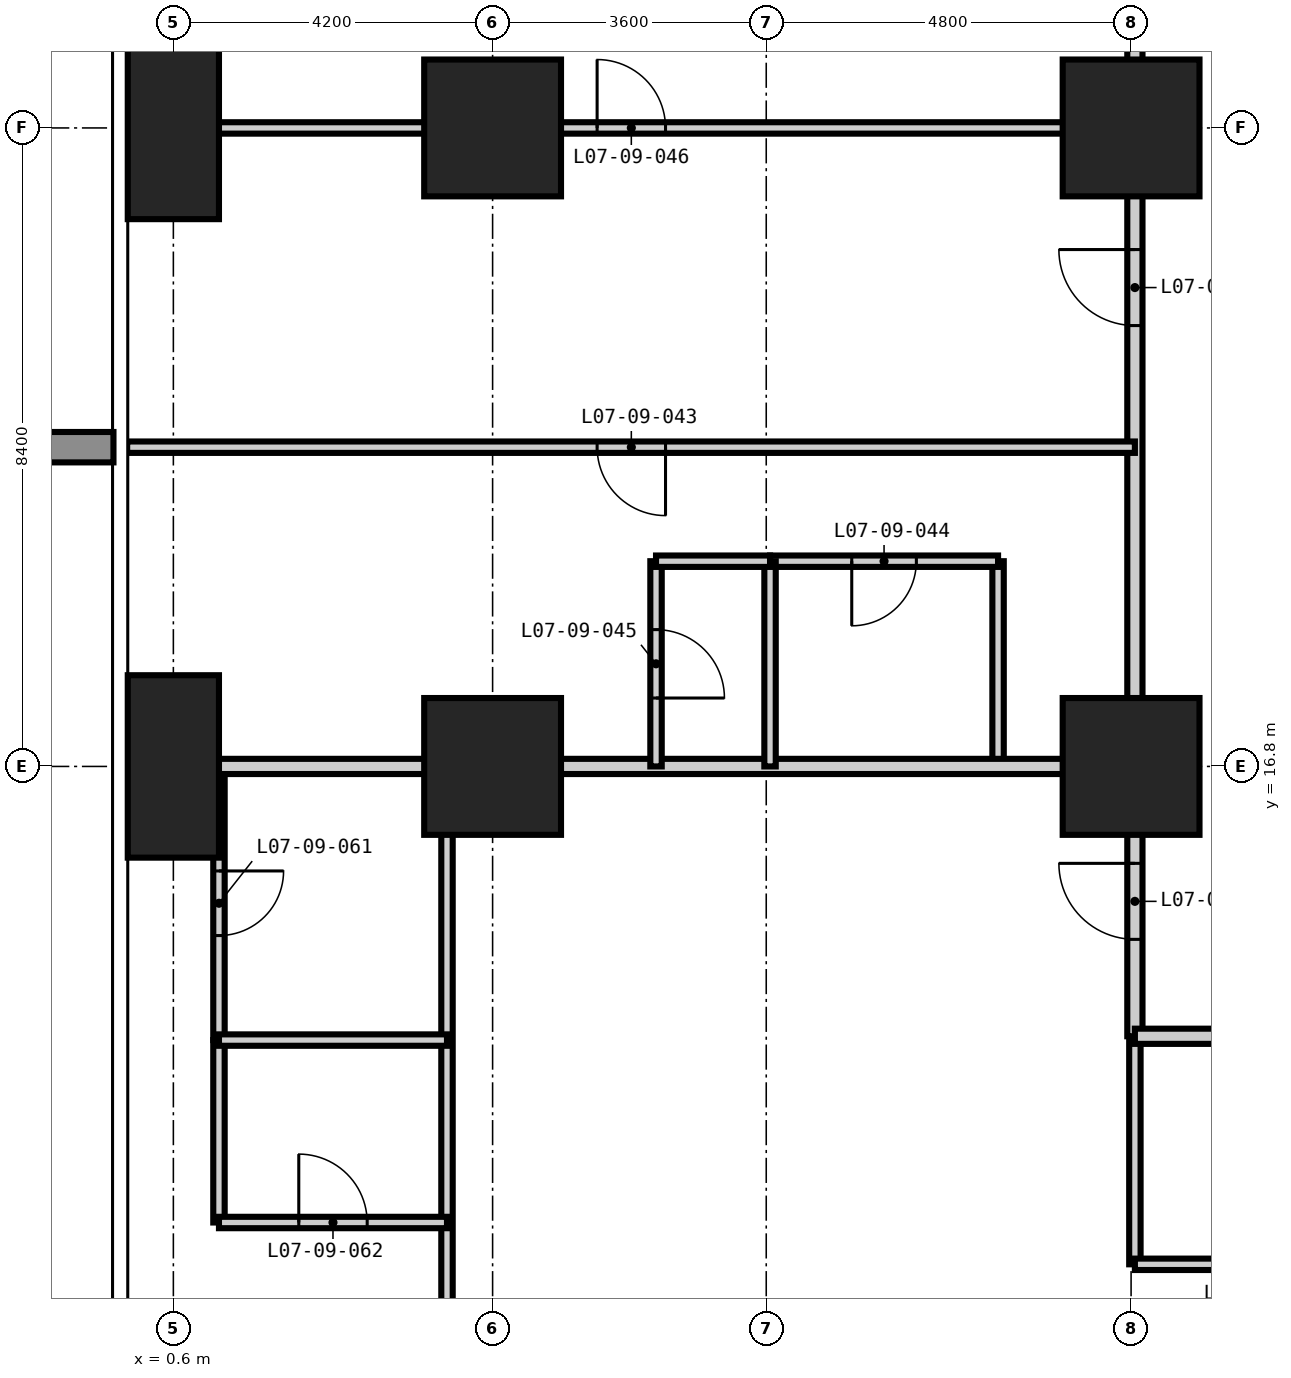
"""IFC4 building model, lengths in metres.
Left out: names, types, materials, properties, quantities, classifications, styles, units other than length and angle.
Written with IfcOpenShell. Run it as: python <this file> out.ifc"""

import sys

from ifc_helpers import new_model, si_unit, direction, frame, frame_2d, origin, origin_2d, place, context, subcontext, project, spatial, rectangle, extrude, element, fill, save


model = new_model("IFC4")
c1 = context("Model", 3, precision=1e-05, world=origin(), true_north=direction((0.0, 1.0)))
c2 = subcontext(c1, "Body", "Model", "MODEL_VIEW")
j1 = project(units=[si_unit("LENGTHUNIT", "METRE"), si_unit("PLANEANGLEUNIT", "RADIAN")], contexts=[c1])
p1 = place(None, origin())
s1 = spatial("IfcSite", under=j1, at=p1, CompositionType="ELEMENT")
p2 = place(p1, origin())
s2 = spatial("IfcBuilding", under=s1, at=p2, CompositionType="ELEMENT")
p3 = place(p2, frame((0.0, 0.0, 34.2)))
s3 = spatial("IfcBuildingStorey", under=s2, at=p3, CompositionType="ELEMENT", Elevation=34.2)
for number, where, z_axis, x_axis in (
    (1, (0.6, 16.8, -0.35), (0.0, 0.0, 1.0), (1.0, 0.0, 0.0)),
    (2, (0.6, 25.2, -0.35), (0.0, 0.0, 1.0), (1.0, 0.0, 0.0)),
):
    element("IfcColumn", number, at=place(p3, frame(where, z_axis=z_axis, x_axis=x_axis)), inside=s3, PredefinedType="COLUMN", context=c2, shape_type="SweptSolid", body=[
        extrude(rectangle(XDim=1.2, YDim=2.4, at=origin_2d()), origin(), (0.0, 0.0, 1.0), 3.6),
    ])
for number, where, z_axis, x_axis in (
    (3, (4.8, 16.8, -0.35), (0.0, 0.0, 1.0), (1.0, 0.0, 0.0)),
    (4, (4.8, 25.2, -0.35), (0.0, 0.0, 1.0), (1.0, 0.0, 0.0)),
    (5, (13.2, 16.8, -0.35), (0.0, 0.0, 1.0), (1.0, 0.0, 0.0)),
    (6, (13.2, 25.2, -0.35), (0.0, 0.0, 1.0), (1.0, 0.0, 0.0)),
):
    element("IfcColumn", number, at=place(p3, frame(where, z_axis=z_axis, x_axis=x_axis)), inside=s3, PredefinedType="COLUMN", context=c2, shape_type="SweptSolid", body=[
        extrude(rectangle(XDim=1.8, YDim=1.8, at=origin_2d()), origin(), (0.0, 0.0, 1.0), 3.6),
    ])
p4 = place(p3, frame((1.2, 13.2, 0.0), z_axis=(0.0, 0.0, 1.0), x_axis=(0.0, 1.0, 0.0)))
e7 = element("IfcWall", 7, at=p4, inside=s3, PredefinedType="PARTITIONING", context=c2, shape_type="SweptSolid", body=[
    extrude(rectangle(XDim=3.6, YDim=0.15, at=frame_2d((1.8, 0.0))), origin(), (0.0, 0.0, 1.0), 3.25),
])
p5 = place(p4, frame((1.375, 0.0, 0.0)))
e8 = element("IfcOpeningElement", 8, at=p5, cuts=e7, PredefinedType="OPENING", context=c2, shape_type="SweptSolid", body=[
    extrude(rectangle(XDim=0.85, YDim=2.1, at=frame_2d((0.425, 1.05))), frame((0.0, 0.085, 0.0), z_axis=(0.0, -1.0, 0.0), x_axis=(1.0, 0.0, 0.0)), (0.0, 0.0, 1.0), 0.17),
])
p6 = place(p3, frame((11.45, 16.8, 0.0), z_axis=(0.0, 0.0, 1.0), x_axis=(0.0, 1.0, 0.0)))
e9 = element("IfcWall", 9, at=p6, inside=s3, PredefinedType="PARTITIONING", context=c2, shape_type="SweptSolid", body=[
    extrude(rectangle(XDim=2.7, YDim=0.15, at=frame_2d((1.35, 0.0))), origin(), (0.0, 0.0, 1.0), 3.25),
])
p7 = place(p3, frame((13.25, 10.25, 0.0), z_axis=(0.0, 0.0, 1.0), x_axis=(0.0, 1.0, 0.0)))
e10 = element("IfcWall", 10, at=p7, inside=s3, PredefinedType="PARTITIONING", context=c2, shape_type="SweptSolid", body=[
    extrude(rectangle(XDim=3.0, YDim=0.15, at=frame_2d((1.5, 0.0))), origin(), (0.0, 0.0, 1.0), 3.25),
])
p8 = place(p3, frame((13.25, 10.25, 0.0), z_axis=(0.0, 0.0, 1.0), x_axis=(1.0, 0.0, 0.0)))
e11 = element("IfcWall", 11, at=p8, inside=s3, PredefinedType="PARTITIONING", context=c2, shape_type="SweptSolid", body=[
    extrude(rectangle(XDim=3.55, YDim=0.15, at=frame_2d((1.775, 0.0))), origin(), (0.0, 0.0, 1.0), 3.25),
])
p9 = place(p8, frame((1.35, 0.0, 0.0)))
e12 = element("IfcOpeningElement", 12, at=p9, cuts=e11, PredefinedType="OPENING", context=c2, shape_type="SweptSolid", body=[
    extrude(rectangle(XDim=0.85, YDim=2.1, at=frame_2d((0.425, 1.05))), frame((0.0, 0.085, 0.0), z_axis=(0.0, -1.0, 0.0), x_axis=(1.0, 0.0, 0.0)), (0.0, 0.0, 1.0), 0.17),
])
p10 = place(p3, frame((8.45, 19.5, 0.0), z_axis=(0.0, 0.0, 1.0), x_axis=(1.0, 0.0, 0.0)))
e13 = element("IfcWall", 13, at=p10, inside=s3, PredefinedType="PARTITIONING", context=c2, shape_type="SweptSolid", body=[
    extrude(rectangle(XDim=3.0, YDim=0.15, at=frame_2d((1.5, 0.0))), origin(), (0.0, 0.0, 1.0), 3.25),
])
p11 = place(p10, frame((1.075, 0.0, 0.0)))
e14 = element("IfcOpeningElement", 14, at=p11, cuts=e13, PredefinedType="OPENING", context=c2, shape_type="SweptSolid", body=[
    extrude(rectangle(XDim=0.85, YDim=2.1, at=frame_2d((0.425, 1.05))), frame((0.0, 0.085, 0.0), z_axis=(0.0, -1.0, 0.0), x_axis=(1.0, 0.0, 0.0)), (0.0, 0.0, 1.0), 0.17),
])
p12 = place(p3, frame((13.25, 13.25, 0.0), z_axis=(0.0, 0.0, 1.0), x_axis=(0.0, 1.0, 0.0)))
e15 = element("IfcWall", 15, at=p12, inside=s3, PredefinedType="PARTITIONING", context=c2, shape_type="SweptSolid", body=[
    extrude(rectangle(XDim=32.0, YDim=0.2, at=frame_2d((16.0, 0.0))), origin(), (0.0, 0.0, 1.0), 3.25),
])
p13 = place(p12, frame((9.35, 0.0, 0.0)))
e16 = element("IfcOpeningElement", 16, at=p13, cuts=e15, PredefinedType="OPENING", context=c2, shape_type="SweptSolid", body=[
    extrude(rectangle(XDim=1.0, YDim=2.2, at=frame_2d((0.5, 1.1))), frame((0.0, 0.11, 0.0), z_axis=(0.0, -1.0, 0.0), x_axis=(1.0, 0.0, 0.0)), (0.0, 0.0, 1.0), 0.22),
])
p14 = place(p12, frame((16.4, 0.0, 0.0)))
e17 = element("IfcOpeningElement", 17, at=p14, cuts=e15, PredefinedType="OPENING", context=c2, shape_type="SweptSolid", body=[
    extrude(rectangle(XDim=1.0, YDim=2.2, at=frame_2d((0.5, 1.1))), frame((0.0, 0.11, 0.0), z_axis=(0.0, -1.0, 0.0), x_axis=(1.0, 0.0, 0.0)), (0.0, 0.0, 1.0), 0.22),
])
p15 = place(p12, frame((23.3, 0.0, 0.0)))
e18 = element("IfcOpeningElement", 18, at=p15, cuts=e15, PredefinedType="OPENING", context=c2, shape_type="SweptSolid", body=[
    extrude(rectangle(XDim=1.0, YDim=2.2, at=frame_2d((0.5, 1.1))), frame((0.0, 0.11, 0.0), z_axis=(0.0, -1.0, 0.0), x_axis=(1.0, 0.0, 0.0)), (0.0, 0.0, 1.0), 0.22),
])
p16 = place(p12, frame((24.8, 0.0, 0.0)))
e19 = element("IfcOpeningElement", 19, at=p16, cuts=e15, PredefinedType="OPENING", context=c2, shape_type="SweptSolid", body=[
    extrude(rectangle(XDim=1.0, YDim=2.2, at=frame_2d((0.5, 1.1))), frame((0.0, 0.11, 0.0), z_axis=(0.0, -1.0, 0.0), x_axis=(1.0, 0.0, 0.0)), (0.0, 0.0, 1.0), 0.22),
])
p17 = place(p12, frame((1.275, 0.0, 0.0)))
e20 = element("IfcOpeningElement", 20, at=p17, cuts=e15, PredefinedType="OPENING", context=c2, shape_type="SweptSolid", body=[
    extrude(rectangle(XDim=1.0, YDim=2.2, at=frame_2d((0.5, 1.1))), frame((0.0, 0.11, 0.0), z_axis=(0.0, -1.0, 0.0), x_axis=(1.0, 0.0, 0.0)), (0.0, 0.0, 1.0), 0.22),
])
p18 = place(p12, frame((29.875, 0.0, 0.0)))
e21 = element("IfcOpeningElement", 21, at=p18, cuts=e15, PredefinedType="OPENING", context=c2, shape_type="SweptSolid", body=[
    extrude(rectangle(XDim=1.0, YDim=2.2, at=frame_2d((0.5, 1.1))), frame((0.0, 0.11, 0.0), z_axis=(0.0, -1.0, 0.0), x_axis=(1.0, 0.0, 0.0)), (0.0, 0.0, 1.0), 0.22),
])
p19 = place(p3, frame((45.85, 13.25, 0.0), z_axis=(0.0, 0.0, 1.0), x_axis=(-1.0, 0.0, 0.0)))
e22 = element("IfcWall", 22, at=p19, inside=s3, PredefinedType="PARTITIONING", context=c2, shape_type="SweptSolid", body=[
    extrude(rectangle(XDim=32.6, YDim=0.2, at=frame_2d((16.3, 0.0))), origin(), (0.0, 0.0, 1.0), 3.25),
])
p20 = place(p19, frame((25.1, 0.0, 0.0)))
e23 = element("IfcOpeningElement", 23, at=p20, cuts=e22, PredefinedType="OPENING", context=c2, shape_type="SweptSolid", body=[
    extrude(rectangle(XDim=1.0, YDim=2.2, at=frame_2d((0.5, 1.1))), frame((0.0, 0.11, 0.0), z_axis=(0.0, -1.0, 0.0), x_axis=(1.0, 0.0, 0.0)), (0.0, 0.0, 1.0), 0.22),
])
p21 = place(p19, frame((21.65, 0.0, 0.0)))
e24 = element("IfcOpeningElement", 24, at=p21, cuts=e22, PredefinedType="OPENING", context=c2, shape_type="SweptSolid", body=[
    extrude(rectangle(XDim=1.0, YDim=2.2, at=frame_2d((0.5, 1.1))), frame((0.0, 0.11, 0.0), z_axis=(0.0, -1.0, 0.0), x_axis=(1.0, 0.0, 0.0)), (0.0, 0.0, 1.0), 0.22),
])
p22 = place(p19, frame((11.75, 0.0, 0.0)))
e25 = element("IfcOpeningElement", 25, at=p22, cuts=e22, PredefinedType="OPENING", context=c2, shape_type="SweptSolid", body=[
    extrude(rectangle(XDim=1.0, YDim=2.2, at=frame_2d((0.5, 1.1))), frame((0.0, 0.11, 0.0), z_axis=(0.0, -1.0, 0.0), x_axis=(1.0, 0.0, 0.0)), (0.0, 0.0, 1.0), 0.22),
])
p23 = place(p19, frame((6.8, 0.0, 0.0)))
e26 = element("IfcOpeningElement", 26, at=p23, cuts=e22, PredefinedType="OPENING", context=c2, shape_type="SweptSolid", body=[
    extrude(rectangle(XDim=1.0, YDim=2.2, at=frame_2d((0.5, 1.1))), frame((0.0, 0.11, 0.0), z_axis=(0.0, -1.0, 0.0), x_axis=(1.0, 0.0, 0.0)), (0.0, 0.0, 1.0), 0.22),
])
p24 = place(p3, frame((-0.008, 16.8, 0.0), z_axis=(0.0, 0.0, 1.0), x_axis=(1.0, 0.0, 0.0)))
e27 = element("IfcWall", 27, at=p24, inside=s3, PredefinedType="PARTITIONING", context=c2, shape_type="SweptSolid", body=[
    extrude(rectangle(XDim=13.258, YDim=0.2, at=frame_2d((6.629, 0.0))), origin(), (0.0, 0.0, 1.0), 3.25),
])
p25 = place(p3, frame((1.2, 10.8, 0.0), z_axis=(0.0, 0.0, 1.0), x_axis=(0.0, 1.0, 0.0)))
e28 = element("IfcWall", 28, at=p25, inside=s3, PredefinedType="PARTITIONING", context=c2, shape_type="SweptSolid", body=[
    extrude(rectangle(XDim=2.4, YDim=0.15, at=frame_2d((1.2, 0.0))), origin(), (0.0, 0.0, 1.0), 3.25),
])
p26 = place(p3, frame((4.2, -0.008, 0.0), z_axis=(0.0, 0.0, 1.0), x_axis=(0.0, 1.0, 0.0)))
e29 = element("IfcWall", 29, at=p26, inside=s3, PredefinedType="PARTITIONING", context=c2, shape_type="SweptSolid", body=[
    extrude(rectangle(XDim=16.808, YDim=0.15, at=frame_2d((8.404, 0.0))), origin(), (0.0, 0.0, 1.0), 3.25),
])
p27 = place(p26, frame((4.958, 0.0, 0.0)))
e30 = element("IfcOpeningElement", 30, at=p27, cuts=e29, PredefinedType="OPENING", context=c2, shape_type="SweptSolid", body=[
    extrude(rectangle(XDim=0.9, YDim=2.1, at=frame_2d((0.45, 1.05))), frame((0.0, 0.085, 0.0), z_axis=(0.0, -1.0, 0.0), x_axis=(1.0, 0.0, 0.0)), (0.0, 0.0, 1.0), 0.17),
])
p28 = place(p3, frame((6.95, 16.8, 0.0), z_axis=(0.0, 0.0, 1.0), x_axis=(0.0, 1.0, 0.0)))
e31 = element("IfcWall", 31, at=p28, inside=s3, PredefinedType="PARTITIONING", context=c2, shape_type="SweptSolid", body=[
    extrude(rectangle(XDim=2.7, YDim=0.15, at=frame_2d((1.35, 0.0))), origin(), (0.0, 0.0, 1.0), 3.25),
])
p29 = place(p28, frame((0.9, 0.0, 0.0)))
e32 = element("IfcOpeningElement", 32, at=p29, cuts=e31, PredefinedType="OPENING", context=c2, shape_type="SweptSolid", body=[
    extrude(rectangle(XDim=0.9, YDim=2.1, at=frame_2d((0.45, 1.05))), frame((0.0, 0.085, 0.0), z_axis=(0.0, -1.0, 0.0), x_axis=(1.0, 0.0, 0.0)), (0.0, 0.0, 1.0), 0.17),
])
p30 = place(p3, frame((8.45, 16.8, 0.0), z_axis=(0.0, 0.0, 1.0), x_axis=(0.0, 1.0, 0.0)))
e33 = element("IfcWall", 33, at=p30, inside=s3, PredefinedType="PARTITIONING", context=c2, shape_type="SweptSolid", body=[
    extrude(rectangle(XDim=2.7, YDim=0.15, at=frame_2d((1.35, 0.0))), origin(), (0.0, 0.0, 1.0), 3.25),
])
p31 = place(p3, frame((1.2, 10.8, 0.0), z_axis=(0.0, 0.0, 1.0), x_axis=(1.0, 0.0, 0.0)))
e34 = element("IfcWall", 34, at=p31, inside=s3, PredefinedType="PARTITIONING", context=c2, shape_type="SweptSolid", body=[
    extrude(rectangle(XDim=3.0, YDim=0.15, at=frame_2d((1.5, 0.0))), origin(), (0.0, 0.0, 1.0), 3.25),
])
p32 = place(p31, frame((1.05, 0.0, 0.0)))
e35 = element("IfcOpeningElement", 35, at=p32, cuts=e34, PredefinedType="OPENING", context=c2, shape_type="SweptSolid", body=[
    extrude(rectangle(XDim=0.9, YDim=2.1, at=frame_2d((0.45, 1.05))), frame((0.0, 0.085, 0.0), z_axis=(0.0, -1.0, 0.0), x_axis=(1.0, 0.0, 0.0)), (0.0, 0.0, 1.0), 0.17),
])
p33 = place(p3, frame((1.2, 13.2, 0.0), z_axis=(0.0, 0.0, 1.0), x_axis=(1.0, 0.0, 0.0)))
e36 = element("IfcWall", 36, at=p33, inside=s3, PredefinedType="PARTITIONING", context=c2, shape_type="SweptSolid", body=[
    extrude(rectangle(XDim=3.0, YDim=0.15, at=frame_2d((1.5, 0.0))), origin(), (0.0, 0.0, 1.0), 3.25),
])
p34 = place(p3, frame((6.95, 19.5, 0.0), z_axis=(0.0, 0.0, 1.0), x_axis=(1.0, 0.0, 0.0)))
e37 = element("IfcWall", 37, at=p34, inside=s3, PredefinedType="PARTITIONING", context=c2, shape_type="SweptSolid", body=[
    extrude(rectangle(XDim=1.5, YDim=0.15, at=frame_2d((0.75, 0.0))), origin(), (0.0, 0.0, 1.0), 3.25),
])
p35 = place(p3, frame((-0.008, 21.0, 0.0), z_axis=(0.0, 0.0, 1.0), x_axis=(1.0, 0.0, 0.0)))
e38 = element("IfcWall", 38, at=p35, inside=s3, PredefinedType="PARTITIONING", context=c2, shape_type="SweptSolid", body=[
    extrude(rectangle(XDim=13.258, YDim=0.15, at=frame_2d((6.629, 0.0))), origin(), (0.0, 0.0, 1.0), 3.25),
])
p36 = place(p35, frame((6.183, 0.0, 0.0)))
e39 = element("IfcOpeningElement", 39, at=p36, cuts=e38, PredefinedType="OPENING", context=c2, shape_type="SweptSolid", body=[
    extrude(rectangle(XDim=0.9, YDim=2.1, at=frame_2d((0.45, 1.05))), frame((0.0, 0.085, 0.0), z_axis=(0.0, -1.0, 0.0), x_axis=(1.0, 0.0, 0.0)), (0.0, 0.0, 1.0), 0.17),
])
p37 = place(p3, frame((-0.008, 25.2, 0.0), z_axis=(0.0, 0.0, 1.0), x_axis=(1.0, 0.0, 0.0)))
e40 = element("IfcWall", 40, at=p37, inside=s3, PredefinedType="PARTITIONING", context=c2, shape_type="SweptSolid", body=[
    extrude(rectangle(XDim=13.258, YDim=0.15, at=frame_2d((6.629, 0.0))), origin(), (0.0, 0.0, 1.0), 3.25),
])
p38 = place(p37, frame((6.183, 0.0, 0.0)))
e41 = element("IfcOpeningElement", 41, at=p38, cuts=e40, PredefinedType="OPENING", context=c2, shape_type="SweptSolid", body=[
    extrude(rectangle(XDim=0.9, YDim=2.1, at=frame_2d((0.45, 1.05))), frame((0.0, 0.085, 0.0), z_axis=(0.0, -1.0, 0.0), x_axis=(1.0, 0.0, 0.0)), (0.0, 0.0, 1.0), 0.17),
])
p39 = place(p13, origin())
e42 = element("IfcDoor", 42, at=p39, inside=s3, OperationType="SINGLE_SWING_RIGHT", PredefinedType="DOOR", context=c2, shape_type="SweptSolid", body=[
    extrude(rectangle(XDim=1.0, YDim=2.2, at=frame_2d((0.5, 1.1))), frame((0.0, 0.025, 0.0), z_axis=(0.0, -1.0, 0.0), x_axis=(1.0, 0.0, 0.0)), (0.0, 0.0, 1.0), 0.05),
])
fill(e16, e42)
p40 = place(p36, frame((0.9, 0.0, 0.0), z_axis=(0.0, 0.0, 1.0), x_axis=(-1.0, 0.0, 0.0)))
e43 = element("IfcDoor", 43, at=p40, inside=s3, OperationType="SINGLE_SWING_LEFT", PredefinedType="DOOR", context=c2, shape_type="SweptSolid", body=[
    extrude(rectangle(XDim=0.9, YDim=2.1, at=frame_2d((0.45, 1.05))), frame((0.0, 0.025, 0.0), z_axis=(0.0, -1.0, 0.0), x_axis=(1.0, 0.0, 0.0)), (0.0, 0.0, 1.0), 0.05),
])
fill(e39, e43)
p41 = place(p11, frame((0.85, 0.0, 0.0), z_axis=(0.0, 0.0, 1.0), x_axis=(-1.0, 0.0, 0.0)))
e44 = element("IfcDoor", 44, at=p41, inside=s3, OperationType="SINGLE_SWING_RIGHT", PredefinedType="DOOR", context=c2, shape_type="SweptSolid", body=[
    extrude(rectangle(XDim=0.85, YDim=2.1, at=frame_2d((0.425, 1.05))), frame((0.0, 0.025, 0.0), z_axis=(0.0, -1.0, 0.0), x_axis=(1.0, 0.0, 0.0)), (0.0, 0.0, 1.0), 0.05),
])
fill(e14, e44)
p42 = place(p29, frame((0.9, 0.0, 0.0), z_axis=(0.0, 0.0, 1.0), x_axis=(-1.0, 0.0, 0.0)))
e45 = element("IfcDoor", 45, at=p42, inside=s3, OperationType="SINGLE_SWING_RIGHT", PredefinedType="DOOR", context=c2, shape_type="SweptSolid", body=[
    extrude(rectangle(XDim=0.9, YDim=2.1, at=frame_2d((0.45, 1.05))), frame((0.0, 0.025, 0.0), z_axis=(0.0, -1.0, 0.0), x_axis=(1.0, 0.0, 0.0)), (0.0, 0.0, 1.0), 0.05),
])
fill(e32, e45)
p43 = place(p38, origin())
e46 = element("IfcDoor", 46, at=p43, inside=s3, OperationType="SINGLE_SWING_LEFT", PredefinedType="DOOR", context=c2, shape_type="SweptSolid", body=[
    extrude(rectangle(XDim=0.9, YDim=2.1, at=frame_2d((0.45, 1.05))), frame((0.0, 0.025, 0.0), z_axis=(0.0, -1.0, 0.0), x_axis=(1.0, 0.0, 0.0)), (0.0, 0.0, 1.0), 0.05),
])
fill(e41, e46)
p44 = place(p17, origin())
e47 = element("IfcDoor", 47, at=p44, inside=s3, OperationType="SINGLE_SWING_RIGHT", PredefinedType="DOOR", context=c2, shape_type="SweptSolid", body=[
    extrude(rectangle(XDim=1.0, YDim=2.2, at=frame_2d((0.5, 1.1))), frame((0.0, 0.025, 0.0), z_axis=(0.0, -1.0, 0.0), x_axis=(1.0, 0.0, 0.0)), (0.0, 0.0, 1.0), 0.05),
])
fill(e20, e47)
p45 = place(p5, frame((0.85, 0.0, 0.0), z_axis=(0.0, 0.0, 1.0), x_axis=(-1.0, 0.0, 0.0)))
e48 = element("IfcDoor", 48, at=p45, inside=s3, OperationType="SINGLE_SWING_LEFT", PredefinedType="DOOR", context=c2, shape_type="SweptSolid", body=[
    extrude(rectangle(XDim=0.85, YDim=2.1, at=frame_2d((0.425, 1.05))), frame((0.0, 0.025, 0.0), z_axis=(0.0, -1.0, 0.0), x_axis=(1.0, 0.0, 0.0)), (0.0, 0.0, 1.0), 0.05),
])
fill(e8, e48)
p46 = place(p32, origin())
e49 = element("IfcDoor", 49, at=p46, inside=s3, OperationType="SINGLE_SWING_LEFT", PredefinedType="DOOR", context=c2, shape_type="SweptSolid", body=[
    extrude(rectangle(XDim=0.9, YDim=2.1, at=frame_2d((0.45, 1.05))), frame((0.0, 0.025, 0.0), z_axis=(0.0, -1.0, 0.0), x_axis=(1.0, 0.0, 0.0)), (0.0, 0.0, 1.0), 0.05),
])
fill(e35, e49)
save(model, sys.argv[1])
